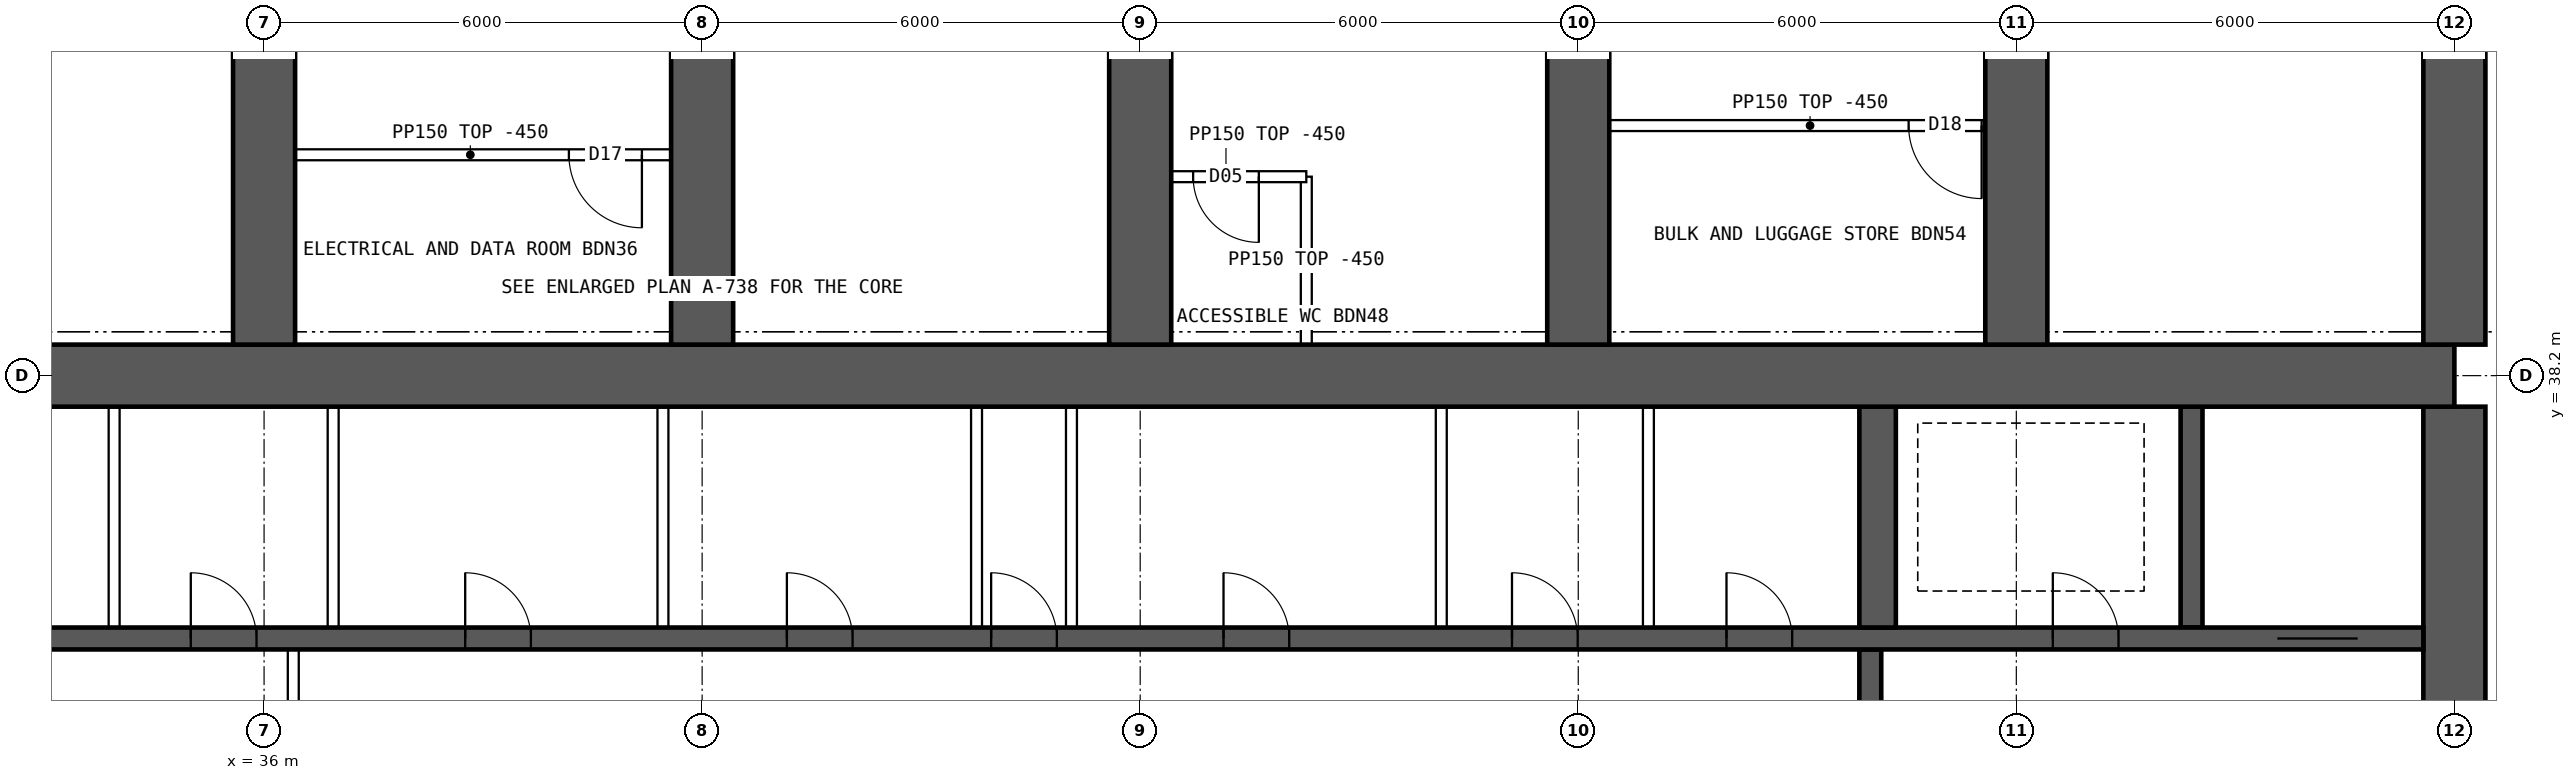
"""IFC4 building model, lengths in metres.
Left out: names, types, materials, properties, quantities, classifications, styles, units other than length and angle.
Written with IfcOpenShell. Run it as: python <this file> out.ifc"""

import sys

from ifc_helpers import new_model, si_unit, direction, frame, frame_2d, origin, place, context, subcontext, project, spatial, rectangle, extrude, element, fill, save


model = new_model("IFC4")
c1 = context("Model", 3, precision=1e-05, world=origin(), true_north=direction((0.0, 1.0)))
c2 = subcontext(c1, "Body", "Model", "MODEL_VIEW")
j1 = project(units=[si_unit("LENGTHUNIT", "METRE"), si_unit("PLANEANGLEUNIT", "RADIAN")], contexts=[c1])
p1 = place(None, origin())
s1 = spatial("IfcSite", under=j1, at=p1, CompositionType="ELEMENT")
p2 = place(p1, origin())
s2 = spatial("IfcBuilding", under=s1, at=p2, CompositionType="ELEMENT")
p3 = place(p2, frame((0.0, 0.0, 144.85)))
s3 = spatial("IfcBuildingStorey", under=s2, at=p3, CompositionType="ELEMENT", Elevation=144.85)
p4 = place(p3, frame((18.0, 38.2, 0.0), z_axis=(0.0, 0.0, 1.0), x_axis=(1.0, 0.0, 0.0)))
e1 = element("IfcWall", 1, at=p4, inside=s3, PredefinedType="SHEAR", context=c2, shape_type="SweptSolid", body=[
    extrude(rectangle(XDim=48.0, YDim=0.85, at=frame_2d((24.0, 0.0))), origin(), (0.0, 0.0, 1.0), 3.75),
])
p5 = place(p3, frame((66.0, 26.225, 0.0), z_axis=(0.0, 0.0, 1.0), x_axis=(0.0, 1.0, 0.0)))
e2 = element("IfcWall", 2, at=p5, inside=s3, PredefinedType="SHEAR", context=c2, shape_type="SweptSolid", body=[
    extrude(rectangle(XDim=11.55, YDim=0.85, at=frame_2d((5.775, 0.0))), origin(), (0.0, 0.0, 1.0), 3.75),
])
p6 = place(p5, frame((5.075, 0.0, 0.0)))
e3 = element("IfcOpeningElement", 3, at=p6, cuts=e2, PredefinedType="OPENING", context=c2, shape_type="SweptSolid", body=[
    extrude(rectangle(XDim=1.2, YDim=2.1, at=frame_2d((0.6, 1.05))), frame((0.0, 0.435, 0.0), z_axis=(0.0, -1.0, 0.0), x_axis=(1.0, 0.0, 0.0)), (0.0, 0.0, 1.0), 0.87),
])
p7 = place(p3, frame((18.425, 34.6, 0.0), z_axis=(0.0, 0.0, 1.0), x_axis=(1.0, 0.0, 0.0)))
e4 = element("IfcWall", 4, at=p7, inside=s3, PredefinedType="SHEAR", context=c2, shape_type="SweptSolid", body=[
    extrude(rectangle(XDim=47.15, YDim=0.3, at=frame_2d((23.575, 0.0))), origin(), (0.0, 0.0, 1.0), 3.75),
])
p8 = place(p7, frame((0.9, 0.0, 0.0)))
e5 = element("IfcOpeningElement", 5, at=p8, cuts=e4, PredefinedType="OPENING", context=c2, shape_type="SweptSolid", body=[
    extrude(rectangle(XDim=1.1, YDim=2.1, at=frame_2d((0.55, 1.05))), frame((0.0, 0.16, 0.0), z_axis=(0.0, -1.0, 0.0), x_axis=(1.0, 0.0, 0.0)), (0.0, 0.0, 1.0), 0.32),
])
p9 = place(p7, frame((45.15, 0.0, 0.0)))
e6 = element("IfcOpeningElement", 6, at=p9, cuts=e4, PredefinedType="OPENING", context=c2, shape_type="SweptSolid", body=[
    extrude(rectangle(XDim=1.1, YDim=2.1, at=frame_2d((0.55, 1.05))), frame((0.0, 0.16, 0.0), z_axis=(0.0, -1.0, 0.0), x_axis=(1.0, 0.0, 0.0)), (0.0, 0.0, 1.0), 0.32),
])
p10 = place(p7, frame((4.175, 0.0, 0.0)))
e7 = element("IfcOpeningElement", 7, at=p10, cuts=e4, PredefinedType="OPENING", context=c2, shape_type="SweptSolid", body=[
    extrude(rectangle(XDim=0.9, YDim=2.1, at=frame_2d((0.45, 1.05))), frame((0.0, 0.16, 0.0), z_axis=(0.0, -1.0, 0.0), x_axis=(1.0, 0.0, 0.0)), (0.0, 0.0, 1.0), 0.32),
])
p11 = place(p7, frame((42.075, 0.0, 0.0)))
e8 = element("IfcOpeningElement", 8, at=p11, cuts=e4, PredefinedType="OPENING", context=c2, shape_type="SweptSolid", body=[
    extrude(rectangle(XDim=0.9, YDim=2.1, at=frame_2d((0.45, 1.05))), frame((0.0, 0.16, 0.0), z_axis=(0.0, -1.0, 0.0), x_axis=(1.0, 0.0, 0.0)), (0.0, 0.0, 1.0), 0.32),
])
p12 = place(p7, frame((8.95, 0.0, 0.0)))
e9 = element("IfcOpeningElement", 9, at=p12, cuts=e4, PredefinedType="OPENING", context=c2, shape_type="SweptSolid", body=[
    extrude(rectangle(XDim=0.9, YDim=2.1, at=frame_2d((0.45, 1.05))), frame((0.0, 0.16, 0.0), z_axis=(0.0, -1.0, 0.0), x_axis=(1.0, 0.0, 0.0)), (0.0, 0.0, 1.0), 0.32),
])
p13 = place(p7, frame((12.924, 0.0, 0.0)))
e10 = element("IfcOpeningElement", 10, at=p13, cuts=e4, PredefinedType="OPENING", context=c2, shape_type="SweptSolid", body=[
    extrude(rectangle(XDim=0.9, YDim=2.1, at=frame_2d((0.45, 1.05))), frame((0.0, 0.16, 0.0), z_axis=(0.0, -1.0, 0.0), x_axis=(1.0, 0.0, 0.0)), (0.0, 0.0, 1.0), 0.32),
])
p14 = place(p7, frame((16.571, 0.0, 0.0)))
e11 = element("IfcOpeningElement", 11, at=p14, cuts=e4, PredefinedType="OPENING", context=c2, shape_type="SweptSolid", body=[
    extrude(rectangle(XDim=0.9, YDim=2.1, at=frame_2d((0.45, 1.05))), frame((0.0, 0.16, 0.0), z_axis=(0.0, -1.0, 0.0), x_axis=(1.0, 0.0, 0.0)), (0.0, 0.0, 1.0), 0.32),
])
p15 = place(p7, frame((20.33, 0.0, 0.0)))
e12 = element("IfcOpeningElement", 12, at=p15, cuts=e4, PredefinedType="OPENING", context=c2, shape_type="SweptSolid", body=[
    extrude(rectangle(XDim=0.9, YDim=2.1, at=frame_2d((0.45, 1.05))), frame((0.0, 0.16, 0.0), z_axis=(0.0, -1.0, 0.0), x_axis=(1.0, 0.0, 0.0)), (0.0, 0.0, 1.0), 0.32),
])
p16 = place(p7, frame((24.736, 0.0, 0.0)))
e13 = element("IfcOpeningElement", 13, at=p16, cuts=e4, PredefinedType="OPENING", context=c2, shape_type="SweptSolid", body=[
    extrude(rectangle(XDim=0.9, YDim=2.1, at=frame_2d((0.45, 1.05))), frame((0.0, 0.16, 0.0), z_axis=(0.0, -1.0, 0.0), x_axis=(1.0, 0.0, 0.0)), (0.0, 0.0, 1.0), 0.32),
])
p17 = place(p7, frame((27.533, 0.0, 0.0)))
e14 = element("IfcOpeningElement", 14, at=p17, cuts=e4, PredefinedType="OPENING", context=c2, shape_type="SweptSolid", body=[
    extrude(rectangle(XDim=0.9, YDim=2.1, at=frame_2d((0.45, 1.05))), frame((0.0, 0.16, 0.0), z_axis=(0.0, -1.0, 0.0), x_axis=(1.0, 0.0, 0.0)), (0.0, 0.0, 1.0), 0.32),
])
p18 = place(p7, frame((30.716, 0.0, 0.0)))
e15 = element("IfcOpeningElement", 15, at=p18, cuts=e4, PredefinedType="OPENING", context=c2, shape_type="SweptSolid", body=[
    extrude(rectangle(XDim=0.9, YDim=2.1, at=frame_2d((0.45, 1.05))), frame((0.0, 0.16, 0.0), z_axis=(0.0, -1.0, 0.0), x_axis=(1.0, 0.0, 0.0)), (0.0, 0.0, 1.0), 0.32),
])
p19 = place(p7, frame((34.667, 0.0, 0.0)))
e16 = element("IfcOpeningElement", 16, at=p19, cuts=e4, PredefinedType="OPENING", context=c2, shape_type="SweptSolid", body=[
    extrude(rectangle(XDim=0.9, YDim=2.1, at=frame_2d((0.45, 1.05))), frame((0.0, 0.16, 0.0), z_axis=(0.0, -1.0, 0.0), x_axis=(1.0, 0.0, 0.0)), (0.0, 0.0, 1.0), 0.32),
])
p20 = place(p7, frame((37.605, 0.0, 0.0)))
e17 = element("IfcOpeningElement", 17, at=p20, cuts=e4, PredefinedType="OPENING", context=c2, shape_type="SweptSolid", body=[
    extrude(rectangle(XDim=0.9, YDim=2.1, at=frame_2d((0.45, 1.05))), frame((0.0, 0.16, 0.0), z_axis=(0.0, -1.0, 0.0), x_axis=(1.0, 0.0, 0.0)), (0.0, 0.0, 1.0), 0.32),
])
p21 = place(p3, frame((58.0, 30.55, 0.0), z_axis=(0.0, 0.0, 1.0), x_axis=(0.0, 1.0, 0.0)))
e18 = element("IfcWall", 18, at=p21, inside=s3, PredefinedType="SHEAR", context=c2, shape_type="SweptSolid", body=[
    extrude(rectangle(XDim=3.9, YDim=0.3, at=frame_2d((1.95, 0.0))), origin(), (0.0, 0.0, 1.0), 3.75),
])
p22 = place(p21, frame((1.4, 0.0, 0.0)))
e19 = element("IfcOpeningElement", 19, at=p22, cuts=e18, PredefinedType="OPENING", context=c2, shape_type="SweptSolid", body=[
    extrude(rectangle(XDim=1.2, YDim=2.1, at=frame_2d((0.6, 1.05))), frame((0.0, 0.16, 0.0), z_axis=(0.0, -1.0, 0.0), x_axis=(1.0, 0.0, 0.0)), (0.0, 0.0, 1.0), 0.32),
])
p23 = place(p3, frame((62.4, 34.75, 0.0), z_axis=(0.0, 0.0, 1.0), x_axis=(0.0, 1.0, 0.0)))
e20 = element("IfcWall", 20, at=p23, inside=s3, PredefinedType="SHEAR", context=c2, shape_type="SweptSolid", body=[
    extrude(rectangle(XDim=3.025, YDim=0.3, at=frame_2d((1.512, 0.0))), origin(), (0.0, 0.0, 1.0), 3.75),
])
p24 = place(p3, frame((58.1, 34.75, 0.0), z_axis=(0.0, 0.0, 1.0), x_axis=(0.0, 1.0, 0.0)))
e21 = element("IfcWall", 21, at=p24, inside=s3, PredefinedType="SHEAR", context=c2, shape_type="SweptSolid", body=[
    extrude(rectangle(XDim=3.025, YDim=0.5, at=frame_2d((1.512, 0.0))), origin(), (0.0, 0.0, 1.0), 3.75),
])
for number, where, z_axis, x_axis in (
    (22, (36.0, 38.625, 0.0), (0.0, 0.0, 1.0), (0.0, 1.0, 0.0)),
    (23, (42.0, 38.625, 0.0), (0.0, 0.0, 1.0), (0.0, 1.0, 0.0)),
    (24, (48.0, 38.625, 0.0), (0.0, 0.0, 1.0), (0.0, 1.0, 0.0)),
    (25, (54.0, 38.625, 0.0), (0.0, 0.0, 1.0), (0.0, 1.0, 0.0)),
    (26, (60.0, 38.625, 0.0), (0.0, 0.0, 1.0), (0.0, 1.0, 0.0)),
    (27, (66.0, 38.625, 0.0), (0.0, 0.0, 1.0), (0.0, 1.0, 0.0)),
):
    element("IfcWall", number, at=place(p3, frame(where, z_axis=z_axis, x_axis=x_axis)), inside=s3, PredefinedType="SHEAR", context=c2, shape_type="SweptSolid", body=[
        extrude(rectangle(XDim=8.175, YDim=0.85, at=frame_2d((4.087, 0.0))), origin(), (0.0, 0.0, 1.0), 3.75),
    ])
p25 = place(p3, frame((36.4, 30.55, 0.0), z_axis=(0.0, 0.0, 1.0), x_axis=(0.0, 1.0, 0.0)))
e28 = element("IfcWall", 28, at=p25, inside=s3, PredefinedType="SOLIDWALL", context=c2, shape_type="SweptSolid", body=[
    extrude(rectangle(XDim=3.9, YDim=0.15, at=frame_2d((1.95, 0.0))), origin(), (0.0, 0.0, 1.0), 3.3),
])
p26 = place(p25, frame((1.15, 0.0, 0.0)))
e29 = element("IfcOpeningElement", 29, at=p26, cuts=e28, PredefinedType="OPENING", context=c2, shape_type="SweptSolid", body=[
    extrude(rectangle(XDim=1.6, YDim=2.1, at=frame_2d((0.8, 1.05))), frame((0.0, 0.085, 0.0), z_axis=(0.0, -1.0, 0.0), x_axis=(1.0, 0.0, 0.0)), (0.0, 0.0, 1.0), 0.17),
])
for number, where, z_axis, x_axis in (
    (30, (33.946, 34.75, 0.0), (0.0, 0.0, 1.0), (0.0, 1.0, 0.0)),
    (31, (36.946, 34.75, 0.0), (0.0, 0.0, 1.0), (0.0, 1.0, 0.0)),
    (32, (41.463, 34.75, 0.0), (0.0, 0.0, 1.0), (0.0, 1.0, 0.0)),
    (33, (45.758, 34.75, 0.0), (0.0, 0.0, 1.0), (0.0, 1.0, 0.0)),
    (34, (47.058, 34.75, 0.0), (0.0, 0.0, 1.0), (0.0, 1.0, 0.0)),
    (35, (52.124, 34.75, 0.0), (0.0, 0.0, 1.0), (0.0, 1.0, 0.0)),
    (36, (54.961, 34.75, 0.0), (0.0, 0.0, 1.0), (0.0, 1.0, 0.0)),
):
    element("IfcWall", number, at=place(p3, frame(where, z_axis=z_axis, x_axis=x_axis)), inside=s3, PredefinedType="SOLIDWALL", context=c2, shape_type="SweptSolid", body=[
        extrude(rectangle(XDim=3.025, YDim=0.15, at=frame_2d((1.512, 0.0))), origin(), (0.0, 0.0, 1.0), 3.3),
    ])
p27 = place(p3, frame((41.575, 41.225, 0.0), z_axis=(0.0, 0.0, 1.0), x_axis=(-1.0, 0.0, 0.0)))
e37 = element("IfcWall", 37, at=p27, inside=s3, PredefinedType="PARTITIONING", context=c2, shape_type="SweptSolid", body=[
    extrude(rectangle(XDim=5.5, YDim=0.15, at=frame_2d((2.75, 0.0))), origin(), (0.0, 0.0, 1.0), 3.3),
])
p28 = place(p27, frame((0.4, 0.0, 0.0)))
e38 = element("IfcOpeningElement", 38, at=p28, cuts=e37, PredefinedType="OPENING", context=c2, shape_type="SweptSolid", body=[
    extrude(rectangle(XDim=1.0, YDim=2.1, at=frame_2d((0.5, 1.05))), frame((0.0, 0.085, 0.0), z_axis=(0.0, -1.0, 0.0), x_axis=(1.0, 0.0, 0.0)), (0.0, 0.0, 1.0), 0.17),
])
p29 = place(p3, frame((50.275, 40.925, 0.0), z_axis=(0.0, 0.0, 1.0), x_axis=(0.0, -1.0, 0.0)))
e39 = element("IfcWall", 39, at=p29, inside=s3, PredefinedType="PARTITIONING", context=c2, shape_type="SweptSolid", body=[
    extrude(rectangle(XDim=2.3, YDim=0.15, at=frame_2d((1.15, 0.0))), origin(), (0.0, 0.0, 1.0), 3.3),
])
p30 = place(p3, frame((50.275, 40.925, 0.0), z_axis=(0.0, 0.0, 1.0), x_axis=(-1.0, 0.0, 0.0)))
e40 = element("IfcWall", 40, at=p30, inside=s3, PredefinedType="PARTITIONING", context=c2, shape_type="SweptSolid", body=[
    extrude(rectangle(XDim=2.2, YDim=0.15, at=frame_2d((1.1, 0.0))), origin(), (0.0, 0.0, 1.0), 3.3),
])
p31 = place(p30, frame((0.65, 0.0, 0.0)))
e41 = element("IfcOpeningElement", 41, at=p31, cuts=e40, PredefinedType="OPENING", context=c2, shape_type="SweptSolid", body=[
    extrude(rectangle(XDim=0.9, YDim=2.1, at=frame_2d((0.45, 1.05))), frame((0.0, 0.085, 0.0), z_axis=(0.0, -1.0, 0.0), x_axis=(1.0, 0.0, 0.0)), (0.0, 0.0, 1.0), 0.17),
])
p32 = place(p3, frame((59.925, 41.625, 0.0), z_axis=(0.0, 0.0, 1.0), x_axis=(-1.0, 0.0, 0.0)))
e42 = element("IfcWall", 42, at=p32, inside=s3, PredefinedType="PARTITIONING", context=c2, shape_type="SweptSolid", body=[
    extrude(rectangle(XDim=5.5, YDim=0.15, at=frame_2d((2.75, 0.0))), origin(), (0.0, 0.0, 1.0), 3.3),
])
p33 = place(p32, frame((0.4, 0.0, 0.0)))
e43 = element("IfcOpeningElement", 43, at=p33, cuts=e42, PredefinedType="OPENING", context=c2, shape_type="SweptSolid", body=[
    extrude(rectangle(XDim=1.0, YDim=2.1, at=frame_2d((0.5, 1.05))), frame((0.0, 0.085, 0.0), z_axis=(0.0, -1.0, 0.0), x_axis=(1.0, 0.0, 0.0)), (0.0, 0.0, 1.0), 0.17),
])
p34 = place(p9, origin())
e44 = element("IfcDoor", 44, at=p34, inside=s3, OperationType="DOUBLE_DOOR_SLIDING", PredefinedType="DOOR", context=c2, shape_type="SweptSolid", body=[
    extrude(rectangle(XDim=1.1, YDim=2.1, at=frame_2d((0.55, 1.05))), frame((0.0, 0.025, 0.0), z_axis=(0.0, -1.0, 0.0), x_axis=(1.0, 0.0, 0.0)), (0.0, 0.0, 1.0), 0.05),
])
fill(e6, e44)
p35 = place(p11, origin())
e45 = element("IfcDoor", 45, at=p35, inside=s3, OperationType="SINGLE_SWING_LEFT", PredefinedType="DOOR", context=c2, shape_type="SweptSolid", body=[
    extrude(rectangle(XDim=0.9, YDim=2.1, at=frame_2d((0.45, 1.05))), frame((0.0, 0.025, 0.0), z_axis=(0.0, -1.0, 0.0), x_axis=(1.0, 0.0, 0.0)), (0.0, 0.0, 1.0), 0.05),
])
fill(e8, e45)
p36 = place(p14, origin())
e46 = element("IfcDoor", 46, at=p36, inside=s3, OperationType="SINGLE_SWING_LEFT", PredefinedType="DOOR", context=c2, shape_type="SweptSolid", body=[
    extrude(rectangle(XDim=0.9, YDim=2.1, at=frame_2d((0.45, 1.05))), frame((0.0, 0.025, 0.0), z_axis=(0.0, -1.0, 0.0), x_axis=(1.0, 0.0, 0.0)), (0.0, 0.0, 1.0), 0.05),
])
fill(e11, e46)
p37 = place(p15, origin())
e47 = element("IfcDoor", 47, at=p37, inside=s3, OperationType="SINGLE_SWING_LEFT", PredefinedType="DOOR", context=c2, shape_type="SweptSolid", body=[
    extrude(rectangle(XDim=0.9, YDim=2.1, at=frame_2d((0.45, 1.05))), frame((0.0, 0.025, 0.0), z_axis=(0.0, -1.0, 0.0), x_axis=(1.0, 0.0, 0.0)), (0.0, 0.0, 1.0), 0.05),
])
fill(e12, e47)
p38 = place(p16, origin())
e48 = element("IfcDoor", 48, at=p38, inside=s3, OperationType="SINGLE_SWING_LEFT", PredefinedType="DOOR", context=c2, shape_type="SweptSolid", body=[
    extrude(rectangle(XDim=0.9, YDim=2.1, at=frame_2d((0.45, 1.05))), frame((0.0, 0.025, 0.0), z_axis=(0.0, -1.0, 0.0), x_axis=(1.0, 0.0, 0.0)), (0.0, 0.0, 1.0), 0.05),
])
fill(e13, e48)
p39 = place(p17, origin())
e49 = element("IfcDoor", 49, at=p39, inside=s3, OperationType="SINGLE_SWING_LEFT", PredefinedType="DOOR", context=c2, shape_type="SweptSolid", body=[
    extrude(rectangle(XDim=0.9, YDim=2.1, at=frame_2d((0.45, 1.05))), frame((0.0, 0.025, 0.0), z_axis=(0.0, -1.0, 0.0), x_axis=(1.0, 0.0, 0.0)), (0.0, 0.0, 1.0), 0.05),
])
fill(e14, e49)
p40 = place(p18, origin())
e50 = element("IfcDoor", 50, at=p40, inside=s3, OperationType="SINGLE_SWING_LEFT", PredefinedType="DOOR", context=c2, shape_type="SweptSolid", body=[
    extrude(rectangle(XDim=0.9, YDim=2.1, at=frame_2d((0.45, 1.05))), frame((0.0, 0.025, 0.0), z_axis=(0.0, -1.0, 0.0), x_axis=(1.0, 0.0, 0.0)), (0.0, 0.0, 1.0), 0.05),
])
fill(e15, e50)
p41 = place(p19, origin())
e51 = element("IfcDoor", 51, at=p41, inside=s3, OperationType="SINGLE_SWING_LEFT", PredefinedType="DOOR", context=c2, shape_type="SweptSolid", body=[
    extrude(rectangle(XDim=0.9, YDim=2.1, at=frame_2d((0.45, 1.05))), frame((0.0, 0.025, 0.0), z_axis=(0.0, -1.0, 0.0), x_axis=(1.0, 0.0, 0.0)), (0.0, 0.0, 1.0), 0.05),
])
fill(e16, e51)
p42 = place(p20, origin())
e52 = element("IfcDoor", 52, at=p42, inside=s3, OperationType="SINGLE_SWING_LEFT", PredefinedType="DOOR", context=c2, shape_type="SweptSolid", body=[
    extrude(rectangle(XDim=0.9, YDim=2.1, at=frame_2d((0.45, 1.05))), frame((0.0, 0.025, 0.0), z_axis=(0.0, -1.0, 0.0), x_axis=(1.0, 0.0, 0.0)), (0.0, 0.0, 1.0), 0.05),
])
fill(e17, e52)
p43 = place(p28, origin())
e53 = element("IfcDoor", 53, at=p43, inside=s3, OperationType="SINGLE_SWING_LEFT", PredefinedType="DOOR", context=c2, shape_type="SweptSolid", body=[
    extrude(rectangle(XDim=1.0, YDim=2.1, at=frame_2d((0.5, 1.05))), frame((0.0, 0.025, 0.0), z_axis=(0.0, -1.0, 0.0), x_axis=(1.0, 0.0, 0.0)), (0.0, 0.0, 1.0), 0.05),
])
fill(e38, e53)
p44 = place(p31, origin())
e54 = element("IfcDoor", 54, at=p44, inside=s3, OperationType="SINGLE_SWING_LEFT", PredefinedType="DOOR", context=c2, shape_type="SweptSolid", body=[
    extrude(rectangle(XDim=0.9, YDim=2.1, at=frame_2d((0.45, 1.05))), frame((0.0, 0.025, 0.0), z_axis=(0.0, -1.0, 0.0), x_axis=(1.0, 0.0, 0.0)), (0.0, 0.0, 1.0), 0.05),
])
fill(e41, e54)
p45 = place(p33, origin())
e55 = element("IfcDoor", 55, at=p45, inside=s3, OperationType="SINGLE_SWING_LEFT", PredefinedType="DOOR", context=c2, shape_type="SweptSolid", body=[
    extrude(rectangle(XDim=1.0, YDim=2.1, at=frame_2d((0.5, 1.05))), frame((0.0, 0.025, 0.0), z_axis=(0.0, -1.0, 0.0), x_axis=(1.0, 0.0, 0.0)), (0.0, 0.0, 1.0), 0.05),
])
fill(e43, e55)
save(model, sys.argv[1])
